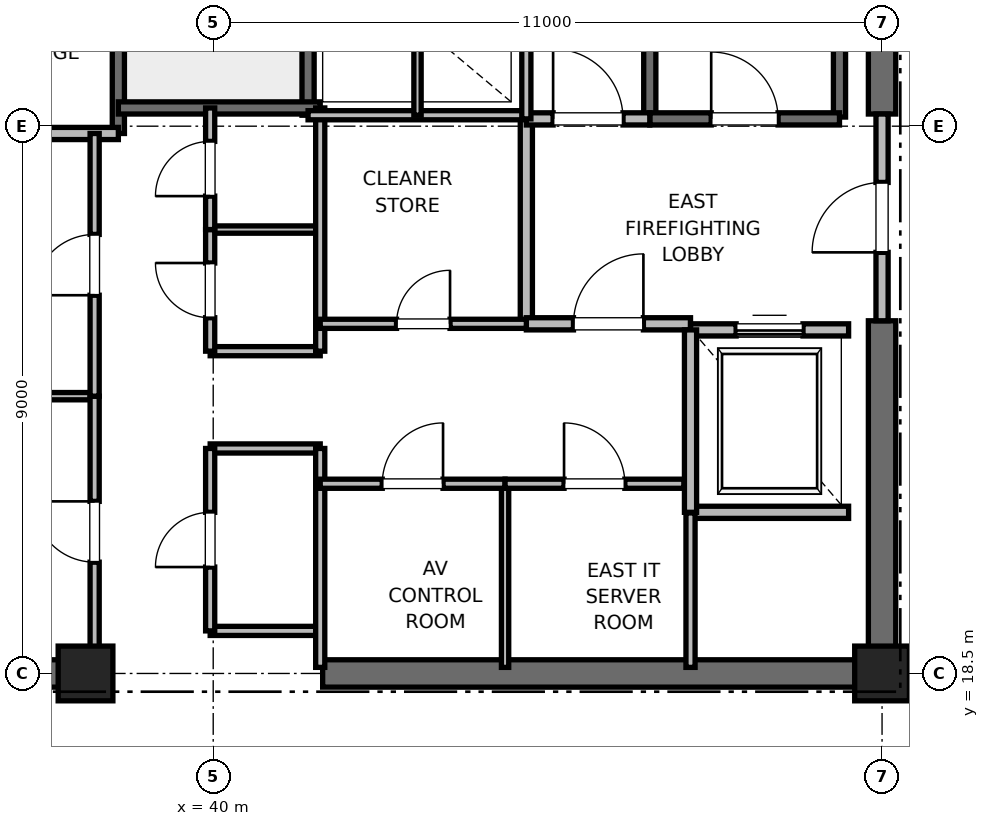
"""IFC4 building model, lengths in metres.
Left out: names, types, materials, properties, quantities, classifications, styles, units other than length and angle.
Written with IfcOpenShell. Run it as: python <this file> out.ifc"""

import sys

from ifc_helpers import new_model, si_unit, direction, frame, frame_2d, origin, origin_2d, place, context, subcontext, project, spatial, rectangle, extrude, element, fill, save


model = new_model("IFC4")
c1 = context("Model", 3, precision=1e-05, world=origin(), true_north=direction((0.0, 1.0)))
c2 = subcontext(c1, "Body", "Model", "MODEL_VIEW")
j1 = project(units=[si_unit("LENGTHUNIT", "METRE"), si_unit("PLANEANGLEUNIT", "RADIAN")], contexts=[c1])
p1 = place(None, origin())
s1 = spatial("IfcSite", under=j1, at=p1, CompositionType="ELEMENT")
p2 = place(p1, origin())
s2 = spatial("IfcBuilding", under=s1, at=p2, CompositionType="ELEMENT")
p3 = place(p2, frame((0.0, 0.0, 255.2)))
s3 = spatial("IfcBuildingStorey", under=s2, at=p3, CompositionType="ELEMENT", Elevation=255.2)
for number, where, z_axis, x_axis in (
    (1, (51.0, 18.5, 0.0), (0.0, 0.0, 1.0), (1.0, 0.0, 0.0)),
    (2, (37.9, 18.5, 0.0), (0.0, 0.0, 1.0), (1.0, 0.0, 0.0)),
):
    element("IfcColumn", number, at=place(p3, frame(where, z_axis=z_axis, x_axis=x_axis)), inside=s3, PredefinedType="PILASTER", context=c2, shape_type="SweptSolid", body=[
        extrude(rectangle(XDim=0.9, YDim=0.9, at=origin_2d()), origin(), (0.0, 0.0, 1.0), 4.0),
    ])
for number, where, z_axis, x_axis in (
    (3, (29.0, 18.5, 0.0), (0.0, 0.0, 1.0), (1.0, 0.0, 0.0)),
    (4, (41.8, 18.5, 0.0), (0.0, 0.0, 1.0), (1.0, 0.0, 0.0)),
):
    element("IfcWall", number, at=place(p3, frame(where, z_axis=z_axis, x_axis=x_axis)), inside=s3, PredefinedType="SHEAR", context=c2, shape_type="SweptSolid", body=[
        extrude(rectangle(XDim=9.2, YDim=0.45, at=frame_2d((4.6, 0.0))), origin(), (0.0, 0.0, 1.0), 3.785),
    ])
p4 = place(p3, frame((51.0, 18.5, 0.0), z_axis=(0.0, 0.0, 1.0), x_axis=(0.0, 1.0, 0.0)))
e5 = element("IfcWall", 5, at=p4, inside=s3, PredefinedType="SHEAR", context=c2, shape_type="SweptSolid", body=[
    extrude(rectangle(XDim=5.8, YDim=0.45, at=frame_2d((2.9, 0.0))), origin(), (0.0, 0.0, 1.0), 3.785),
])
p5 = place(p3, frame((51.0, 27.7, 0.0), z_axis=(0.0, 0.0, 1.0), x_axis=(0.0, 1.0, 0.0)))
e6 = element("IfcWall", 6, at=p5, inside=s3, PredefinedType="SHEAR", context=c2, shape_type="SweptSolid", body=[
    extrude(rectangle(XDim=8.8, YDim=0.45, at=frame_2d((4.4, 0.0))), origin(), (0.0, 0.0, 1.0), 3.785),
])
p6 = place(p3, frame((50.3, 27.65, 0.0), z_axis=(0.0, 0.0, 1.0), x_axis=(0.0, 1.0, 0.0)))
e7 = element("IfcWall", 7, at=p6, inside=s3, PredefinedType="SOLIDWALL", context=c2, shape_type="SweptSolid", body=[
    extrude(rectangle(XDim=8.15, YDim=0.2, at=frame_2d((4.075, 0.0))), origin(), (0.0, 0.0, 1.0), 3.785),
])
p7 = place(p3, frame((47.18, 27.62, 0.0), z_axis=(0.0, 0.0, 1.0), x_axis=(0.0, 1.0, 0.0)))
e8 = element("IfcWall", 8, at=p7, inside=s3, PredefinedType="SOLIDWALL", context=c2, shape_type="SweptSolid", body=[
    extrude(rectangle(XDim=8.18, YDim=0.2, at=frame_2d((4.09, 0.0))), origin(), (0.0, 0.0, 1.0), 3.785),
])
p8 = place(p3, frame((47.18, 27.62, 0.0), z_axis=(0.0, 0.0, 1.0), x_axis=(1.0, 0.0, 0.0)))
e9 = element("IfcWall", 9, at=p8, inside=s3, PredefinedType="SOLIDWALL", context=c2, shape_type="SweptSolid", body=[
    extrude(rectangle(XDim=3.12, YDim=0.2, at=frame_2d((1.56, 0.0))), origin(), (0.0, 0.0, 1.0), 3.785),
])
p9 = place(p8, frame((1.01, 0.0, 0.0)))
e10 = element("IfcOpeningElement", 10, at=p9, cuts=e9, PredefinedType="OPENING", context=c2, shape_type="SweptSolid", body=[
    extrude(rectangle(XDim=1.1, YDim=2.15, at=frame_2d((0.55, 1.075))), frame((0.0, 0.1, 0.0), z_axis=(0.0, -1.0, 0.0), x_axis=(1.0, 0.0, 0.0)), (0.0, 0.0, 1.0), 0.2),
])
p10 = place(p3, frame((38.44, 27.38, 0.0), z_axis=(0.0, 0.0, 1.0), x_axis=(0.0, 1.0, 0.0)))
e11 = element("IfcWall", 11, at=p10, inside=s3, PredefinedType="SOLIDWALL", context=c2, shape_type="SweptSolid", body=[
    extrude(rectangle(XDim=8.87, YDim=0.2, at=frame_2d((4.435, 0.0))), origin(), (0.0, 0.0, 1.0), 3.785),
])
p11 = place(p3, frame((41.56, 27.68, 0.0), z_axis=(0.0, 0.0, 1.0), x_axis=(0.0, 1.0, 0.0)))
e12 = element("IfcWall", 12, at=p11, inside=s3, PredefinedType="SOLIDWALL", context=c2, shape_type="SweptSolid", body=[
    extrude(rectangle(XDim=8.57, YDim=0.2, at=frame_2d((4.285, 0.0))), origin(), (0.0, 0.0, 1.0), 3.785),
])
p12 = place(p3, frame((38.44, 27.8, 0.0), z_axis=(0.0, 0.0, 1.0), x_axis=(1.0, 0.0, 0.0)))
e13 = element("IfcWall", 13, at=p12, inside=s3, PredefinedType="SOLIDWALL", context=c2, shape_type="SweptSolid", body=[
    extrude(rectangle(XDim=3.32, YDim=0.2, at=frame_2d((1.66, 0.0))), origin(), (0.0, 0.0, 1.0), 3.785),
])
p13 = place(p3, frame((32.82, 27.38, 0.0), z_axis=(0.0, 0.0, 1.0), x_axis=(1.0, 0.0, 0.0)))
e14 = element("IfcWall", 14, at=p13, inside=s3, PredefinedType="PARTITIONING", context=c2, shape_type="SweptSolid", body=[
    extrude(rectangle(XDim=5.62, YDim=0.2, at=frame_2d((2.81, 0.0))), origin(), (0.0, 0.0, 1.0), 3.785),
])
p14 = place(p3, frame((45.15, 24.25, 0.0), z_axis=(0.0, 0.0, 1.0), x_axis=(0.0, 1.0, 0.0)))
e15 = element("IfcWall", 15, at=p14, inside=s3, PredefinedType="PARTITIONING", context=c2, shape_type="SweptSolid", body=[
    extrude(rectangle(XDim=3.37, YDim=0.2, at=frame_2d((1.685, 0.0))), origin(), (0.0, 0.0, 1.0), 3.785),
])
p15 = place(p3, frame((45.15, 24.25, 0.0), z_axis=(0.0, 0.0, 1.0), x_axis=(1.0, 0.0, 0.0)))
e16 = element("IfcWall", 16, at=p15, inside=s3, PredefinedType="PARTITIONING", context=c2, shape_type="SweptSolid", body=[
    extrude(rectangle(XDim=2.7, YDim=0.2, at=frame_2d((1.35, 0.0))), origin(), (0.0, 0.0, 1.0), 3.785),
])
p16 = place(p15, frame((0.775, 0.0, 0.0)))
e17 = element("IfcOpeningElement", 17, at=p16, cuts=e16, PredefinedType="OPENING", context=c2, shape_type="SweptSolid", body=[
    extrude(rectangle(XDim=1.15, YDim=2.2, at=frame_2d((0.575, 1.1))), frame((0.0, 0.1, 0.0), z_axis=(0.0, -1.0, 0.0), x_axis=(1.0, 0.0, 0.0)), (0.0, 0.0, 1.0), 0.2),
])
p17 = place(p3, frame((45.15, 27.62, 0.0), z_axis=(0.0, 0.0, 1.0), x_axis=(1.0, 0.0, 0.0)))
e18 = element("IfcWall", 18, at=p17, inside=s3, PredefinedType="PARTITIONING", context=c2, shape_type="SweptSolid", body=[
    extrude(rectangle(XDim=2.03, YDim=0.2, at=frame_2d((1.015, 0.0))), origin(), (0.0, 0.0, 1.0), 3.785),
])
p18 = place(p17, frame((0.44, 0.0, 0.0)))
e19 = element("IfcOpeningElement", 19, at=p18, cuts=e18, PredefinedType="OPENING", context=c2, shape_type="SweptSolid", body=[
    extrude(rectangle(XDim=1.15, YDim=2.2, at=frame_2d((0.575, 1.1))), frame((0.0, 0.1, 0.0), z_axis=(0.0, -1.0, 0.0), x_axis=(1.0, 0.0, 0.0)), (0.0, 0.0, 1.0), 0.2),
])
p19 = place(p3, frame((51.0, 24.3, 0.0), z_axis=(0.0, 0.0, 1.0), x_axis=(0.0, 1.0, 0.0)))
e20 = element("IfcWall", 20, at=p19, inside=s3, PredefinedType="PARTITIONING", context=c2, shape_type="SweptSolid", body=[
    extrude(rectangle(XDim=3.4, YDim=0.2, at=frame_2d((1.7, 0.0))), origin(), (0.0, 0.0, 1.0), 2.865),
])
p20 = place(p19, frame((1.125, 0.0, 0.0)))
e21 = element("IfcOpeningElement", 21, at=p20, cuts=e20, PredefinedType="OPENING", context=c2, shape_type="SweptSolid", body=[
    extrude(rectangle(XDim=1.15, YDim=2.2, at=frame_2d((0.575, 1.1))), frame((0.0, 0.1, 0.0), z_axis=(0.0, -1.0, 0.0), x_axis=(1.0, 0.0, 0.0)), (0.0, 0.0, 1.0), 0.2),
])
p21 = place(p3, frame((47.85, 21.15, 0.0), z_axis=(0.0, 0.0, 1.0), x_axis=(1.0, 0.0, 0.0)))
e22 = element("IfcWall", 22, at=p21, inside=s3, PredefinedType="SOLIDWALL", context=c2, shape_type="SweptSolid", body=[
    extrude(rectangle(XDim=2.6, YDim=0.2, at=frame_2d((1.3, 0.0))), origin(), (0.0, 0.0, 1.0), 3.785),
])
p22 = place(p3, frame((50.45, 24.15, 0.0), z_axis=(0.0, 0.0, 1.0), x_axis=(-1.0, 0.0, 0.0)))
e23 = element("IfcWall", 23, at=p22, inside=s3, PredefinedType="SOLIDWALL", context=c2, shape_type="SweptSolid", body=[
    extrude(rectangle(XDim=2.6, YDim=0.2, at=frame_2d((1.3, 0.0))), origin(), (0.0, 0.0, 1.0), 2.865),
])
p23 = place(p22, frame((0.75, 0.0, 0.0)))
e24 = element("IfcOpeningElement", 24, at=p23, cuts=e23, PredefinedType="OPENING", context=c2, shape_type="SweptSolid", body=[
    extrude(rectangle(XDim=1.1, YDim=2.2, at=frame_2d((0.55, 1.1))), frame((0.0, 0.1, 0.0), z_axis=(0.0, -1.0, 0.0), x_axis=(1.0, 0.0, 0.0)), (0.0, 0.0, 1.0), 0.2),
])
p24 = place(p3, frame((47.85, 24.15, 0.0), z_axis=(0.0, 0.0, 1.0), x_axis=(0.0, -1.0, 0.0)))
e25 = element("IfcWall", 25, at=p24, inside=s3, PredefinedType="SOLIDWALL", context=c2, shape_type="SweptSolid", body=[
    extrude(rectangle(XDim=3.0, YDim=0.2, at=frame_2d((1.5, 0.0))), origin(), (0.0, 0.0, 1.0), 3.785),
])
for number, where, z_axis, x_axis in (
    (26, (39.95, 19.2, 0.0), (0.0, 0.0, 1.0), (1.0, 0.0, 0.0)),
    (27, (39.95, 22.2, 0.0), (0.0, 0.0, 1.0), (1.0, 0.0, 0.0)),
    (28, (39.95, 23.8, 0.0), (0.0, 0.0, 1.0), (1.0, 0.0, 0.0)),
):
    element("IfcWall", number, at=place(p3, frame(where, z_axis=z_axis, x_axis=x_axis)), inside=s3, PredefinedType="PARTITIONING", context=c2, shape_type="SweptSolid", body=[
        extrude(rectangle(XDim=1.81, YDim=0.15, at=frame_2d((0.905, 0.0))), origin(), (0.0, 0.0, 1.0), 2.85),
    ])
p25 = place(p3, frame((39.95, 25.8, 0.0), z_axis=(0.0, 0.0, 1.0), x_axis=(1.0, 0.0, 0.0)))
e29 = element("IfcWall", 29, at=p25, inside=s3, PredefinedType="PARTITIONING", context=c2, shape_type="SweptSolid", body=[
    extrude(rectangle(XDim=1.81, YDim=0.12, at=frame_2d((0.905, 0.0))), origin(), (0.0, 0.0, 1.0), 2.85),
])
p26 = place(p3, frame((41.76, 18.6, 0.0), z_axis=(0.0, 0.0, 1.0), x_axis=(0.0, 1.0, 0.0)))
e30 = element("IfcWall", 30, at=p26, inside=s3, PredefinedType="PARTITIONING", context=c2, shape_type="SweptSolid", body=[
    extrude(rectangle(XDim=3.6, YDim=0.15, at=frame_2d((1.8, 0.0))), origin(), (0.0, 0.0, 1.0), 2.85),
])
p27 = place(p3, frame((41.76, 23.8, 0.0), z_axis=(0.0, 0.0, 1.0), x_axis=(0.0, 1.0, 0.0)))
e31 = element("IfcWall", 31, at=p27, inside=s3, PredefinedType="PARTITIONING", context=c2, shape_type="SweptSolid", body=[
    extrude(rectangle(XDim=4.0, YDim=0.15, at=frame_2d((2.0, 0.0))), origin(), (0.0, 0.0, 1.0), 2.85),
])
p28 = place(p3, frame((39.95, 19.2, 0.0), z_axis=(0.0, 0.0, 1.0), x_axis=(0.0, 1.0, 0.0)))
e32 = element("IfcWall", 32, at=p28, inside=s3, PredefinedType="PARTITIONING", context=c2, shape_type="SweptSolid", body=[
    extrude(rectangle(XDim=3.0, YDim=0.15, at=frame_2d((1.5, 0.0))), origin(), (0.0, 0.0, 1.0), 2.85),
])
p29 = place(p28, frame((1.05, 0.0, 0.0)))
e33 = element("IfcOpeningElement", 33, at=p29, cuts=e32, PredefinedType="OPENING", context=c2, shape_type="SweptSolid", body=[
    extrude(rectangle(XDim=0.9, YDim=2.1, at=frame_2d((0.45, 1.05))), frame((0.0, 0.075, 0.0), z_axis=(0.0, -1.0, 0.0), x_axis=(1.0, 0.0, 0.0)), (0.0, 0.0, 1.0), 0.15),
])
p30 = place(p3, frame((39.95, 23.8, 0.0), z_axis=(0.0, 0.0, 1.0), x_axis=(0.0, 1.0, 0.0)))
e34 = element("IfcWall", 34, at=p30, inside=s3, PredefinedType="PARTITIONING", context=c2, shape_type="SweptSolid", body=[
    extrude(rectangle(XDim=2.0, YDim=0.15, at=frame_2d((1.0, 0.0))), origin(), (0.0, 0.0, 1.0), 2.85),
])
p31 = place(p30, frame((0.55, 0.0, 0.0)))
e35 = element("IfcOpeningElement", 35, at=p31, cuts=e34, PredefinedType="OPENING", context=c2, shape_type="SweptSolid", body=[
    extrude(rectangle(XDim=0.9, YDim=2.1, at=frame_2d((0.45, 1.05))), frame((0.0, 0.075, 0.0), z_axis=(0.0, -1.0, 0.0), x_axis=(1.0, 0.0, 0.0)), (0.0, 0.0, 1.0), 0.15),
])
p32 = place(p3, frame((39.95, 25.8, 0.0), z_axis=(0.0, 0.0, 1.0), x_axis=(0.0, 1.0, 0.0)))
e36 = element("IfcWall", 36, at=p32, inside=s3, PredefinedType="PARTITIONING", context=c2, shape_type="SweptSolid", body=[
    extrude(rectangle(XDim=2.0, YDim=0.15, at=frame_2d((1.0, 0.0))), origin(), (0.0, 0.0, 1.0), 2.85),
])
p33 = place(p32, frame((0.55, 0.0, 0.0)))
e37 = element("IfcOpeningElement", 37, at=p33, cuts=e36, PredefinedType="OPENING", context=c2, shape_type="SweptSolid", body=[
    extrude(rectangle(XDim=0.9, YDim=2.1, at=frame_2d((0.45, 1.05))), frame((0.0, 0.075, 0.0), z_axis=(0.0, -1.0, 0.0), x_axis=(1.0, 0.0, 0.0)), (0.0, 0.0, 1.0), 0.15),
])
p34 = place(p3, frame((32.82, 23.06, 0.0), z_axis=(0.0, 0.0, 1.0), x_axis=(1.0, 0.0, 0.0)))
e38 = element("IfcWall", 38, at=p34, inside=s3, PredefinedType="PARTITIONING", context=c2, shape_type="SweptSolid", body=[
    extrude(rectangle(XDim=5.23, YDim=0.12, at=frame_2d((2.615, 0.0))), origin(), (0.0, 0.0, 1.0), 2.85),
])
p35 = place(p3, frame((38.05, 18.6, 0.0), z_axis=(0.0, 0.0, 1.0), x_axis=(0.0, 1.0, 0.0)))
e39 = element("IfcWall", 39, at=p35, inside=s3, PredefinedType="PARTITIONING", context=c2, shape_type="SweptSolid", body=[
    extrude(rectangle(XDim=4.46, YDim=0.15, at=frame_2d((2.23, 0.0))), origin(), (0.0, 0.0, 1.0), 2.85),
])
p36 = place(p35, frame((1.73, 0.0, 0.0)))
e40 = element("IfcOpeningElement", 40, at=p36, cuts=e39, PredefinedType="OPENING", context=c2, shape_type="SweptSolid", body=[
    extrude(rectangle(XDim=1.0, YDim=2.15, at=frame_2d((0.5, 1.075))), frame((0.0, 0.075, 0.0), z_axis=(0.0, -1.0, 0.0), x_axis=(1.0, 0.0, 0.0)), (0.0, 0.0, 1.0), 0.15),
])
p37 = place(p3, frame((38.05, 23.06, 0.0), z_axis=(0.0, 0.0, 1.0), x_axis=(0.0, 1.0, 0.0)))
e41 = element("IfcWall", 41, at=p37, inside=s3, PredefinedType="PARTITIONING", context=c2, shape_type="SweptSolid", body=[
    extrude(rectangle(XDim=4.32, YDim=0.15, at=frame_2d((2.16, 0.0))), origin(), (0.0, 0.0, 1.0), 2.85),
])
p38 = place(p37, frame((1.66, 0.0, 0.0)))
e42 = element("IfcOpeningElement", 42, at=p38, cuts=e41, PredefinedType="OPENING", context=c2, shape_type="SweptSolid", body=[
    extrude(rectangle(XDim=1.0, YDim=2.15, at=frame_2d((0.5, 1.075))), frame((0.0, 0.075, 0.0), z_axis=(0.0, -1.0, 0.0), x_axis=(1.0, 0.0, 0.0)), (0.0, 0.0, 1.0), 0.15),
])
p39 = place(p3, frame((41.56, 27.68, 0.0), z_axis=(0.0, 0.0, 1.0), x_axis=(1.0, 0.0, 0.0)))
e43 = element("IfcWall", 43, at=p39, inside=s3, PredefinedType="PARTITIONING", context=c2, shape_type="SweptSolid", body=[
    extrude(rectangle(XDim=3.59, YDim=0.15, at=frame_2d((1.795, 0.0))), origin(), (0.0, 0.0, 1.0), 2.85),
])
p40 = place(p3, frame((47.85, 18.6, 0.0), z_axis=(0.0, 0.0, 1.0), x_axis=(0.0, 1.0, 0.0)))
e44 = element("IfcWall", 44, at=p40, inside=s3, PredefinedType="PARTITIONING", context=c2, shape_type="SweptSolid", body=[
    extrude(rectangle(XDim=2.54, YDim=0.15, at=frame_2d((1.27, 0.0))), origin(), (0.0, 0.0, 1.0), 2.85),
])
p41 = place(p3, frame((44.8, 18.6, 0.0), z_axis=(0.0, 0.0, 1.0), x_axis=(0.0, 1.0, 0.0)))
e45 = element("IfcWall", 45, at=p41, inside=s3, PredefinedType="PARTITIONING", context=c2, shape_type="SweptSolid", body=[
    extrude(rectangle(XDim=3.02, YDim=0.12, at=frame_2d((1.51, 0.0))), origin(), (0.0, 0.0, 1.0), 2.85),
])
p42 = place(p3, frame((41.76, 21.62, 0.0), z_axis=(0.0, 0.0, 1.0), x_axis=(1.0, 0.0, 0.0)))
e46 = element("IfcWall", 46, at=p42, inside=s3, PredefinedType="PARTITIONING", context=c2, shape_type="SweptSolid", body=[
    extrude(rectangle(XDim=3.04, YDim=0.15, at=frame_2d((1.52, 0.0))), origin(), (0.0, 0.0, 1.0), 2.85),
])
p43 = place(p42, frame((1.02, 0.0, 0.0)))
e47 = element("IfcOpeningElement", 47, at=p43, cuts=e46, PredefinedType="OPENING", context=c2, shape_type="SweptSolid", body=[
    extrude(rectangle(XDim=1.0, YDim=2.15, at=frame_2d((0.5, 1.075))), frame((0.0, 0.075, 0.0), z_axis=(0.0, -1.0, 0.0), x_axis=(1.0, 0.0, 0.0)), (0.0, 0.0, 1.0), 0.15),
])
p44 = place(p3, frame((44.8, 21.62, 0.0), z_axis=(0.0, 0.0, 1.0), x_axis=(1.0, 0.0, 0.0)))
e48 = element("IfcWall", 48, at=p44, inside=s3, PredefinedType="PARTITIONING", context=c2, shape_type="SweptSolid", body=[
    extrude(rectangle(XDim=2.94, YDim=0.15, at=frame_2d((1.47, 0.0))), origin(), (0.0, 0.0, 1.0), 2.85),
])
p45 = place(p44, frame((0.97, 0.0, 0.0)))
e49 = element("IfcOpeningElement", 49, at=p45, cuts=e48, PredefinedType="OPENING", context=c2, shape_type="SweptSolid", body=[
    extrude(rectangle(XDim=1.0, YDim=2.15, at=frame_2d((0.5, 1.075))), frame((0.0, 0.075, 0.0), z_axis=(0.0, -1.0, 0.0), x_axis=(1.0, 0.0, 0.0)), (0.0, 0.0, 1.0), 0.15),
])
p46 = place(p3, frame((41.76, 24.25, 0.0), z_axis=(0.0, 0.0, 1.0), x_axis=(1.0, 0.0, 0.0)))
e50 = element("IfcWall", 50, at=p46, inside=s3, PredefinedType="PARTITIONING", context=c2, shape_type="SweptSolid", body=[
    extrude(rectangle(XDim=3.39, YDim=0.15, at=frame_2d((1.695, 0.0))), origin(), (0.0, 0.0, 1.0), 2.85),
])
p47 = place(p46, frame((1.255, 0.0, 0.0)))
e51 = element("IfcOpeningElement", 51, at=p47, cuts=e50, PredefinedType="OPENING", context=c2, shape_type="SweptSolid", body=[
    extrude(rectangle(XDim=0.88, YDim=2.1, at=frame_2d((0.44, 1.05))), frame((0.0, 0.075, 0.0), z_axis=(0.0, -1.0, 0.0), x_axis=(1.0, 0.0, 0.0)), (0.0, 0.0, 1.0), 0.15),
])
p48 = place(p3, frame((45.15, 27.62, 0.0), z_axis=(0.0, 0.0, 1.0), x_axis=(0.0, 1.0, 0.0)))
e52 = element("IfcWall", 52, at=p48, inside=s3, PredefinedType="PARTITIONING", context=c2, shape_type="SweptSolid", body=[
    extrude(rectangle(XDim=3.1, YDim=0.15, at=frame_2d((1.55, 0.0))), origin(), (0.0, 0.0, 1.0), 2.85),
])
p49 = place(p3, frame((43.36, 27.68, 0.0), z_axis=(0.0, 0.0, 1.0), x_axis=(0.0, 1.0, 0.0)))
e53 = element("IfcWall", 53, at=p49, inside=s3, PredefinedType="PARTITIONING", context=c2, shape_type="SweptSolid", body=[
    extrude(rectangle(XDim=3.04, YDim=0.12, at=frame_2d((1.52, 0.0))), origin(), (0.0, 0.0, 1.0), 2.85),
])
p50 = place(p9, origin())
e54 = element("IfcDoor", 54, at=p50, inside=s3, OperationType="SINGLE_SWING_LEFT", PredefinedType="DOOR", context=c2, shape_type="SweptSolid", body=[
    extrude(rectangle(XDim=1.1, YDim=2.15, at=frame_2d((0.55, 1.075))), frame((0.0, 0.025, 0.0), z_axis=(0.0, -1.0, 0.0), x_axis=(1.0, 0.0, 0.0)), (0.0, 0.0, 1.0), 0.05),
])
fill(e10, e54)
p51 = place(p16, origin())
e55 = element("IfcDoor", 55, at=p51, inside=s3, OperationType="SINGLE_SWING_RIGHT", PredefinedType="DOOR", context=c2, shape_type="SweptSolid", body=[
    extrude(rectangle(XDim=1.15, YDim=2.2, at=frame_2d((0.575, 1.1))), frame((0.0, 0.025, 0.0), z_axis=(0.0, -1.0, 0.0), x_axis=(1.0, 0.0, 0.0)), (0.0, 0.0, 1.0), 0.05),
])
fill(e17, e55)
p52 = place(p18, origin())
e56 = element("IfcDoor", 56, at=p52, inside=s3, OperationType="SINGLE_SWING_LEFT", PredefinedType="DOOR", context=c2, shape_type="SweptSolid", body=[
    extrude(rectangle(XDim=1.15, YDim=2.2, at=frame_2d((0.575, 1.1))), frame((0.0, 0.025, 0.0), z_axis=(0.0, -1.0, 0.0), x_axis=(1.0, 0.0, 0.0)), (0.0, 0.0, 1.0), 0.05),
])
fill(e19, e56)
p53 = place(p20, origin())
e57 = element("IfcDoor", 57, at=p53, inside=s3, OperationType="SINGLE_SWING_LEFT", PredefinedType="DOOR", context=c2, shape_type="SweptSolid", body=[
    extrude(rectangle(XDim=1.15, YDim=2.2, at=frame_2d((0.575, 1.1))), frame((0.0, 0.025, 0.0), z_axis=(0.0, -1.0, 0.0), x_axis=(1.0, 0.0, 0.0)), (0.0, 0.0, 1.0), 0.05),
])
fill(e21, e57)
p54 = place(p23, origin())
e58 = element("IfcDoor", 58, at=p54, inside=s3, OperationType="SLIDING_TO_RIGHT", PredefinedType="DOOR", context=c2, shape_type="SweptSolid", body=[
    extrude(rectangle(XDim=1.1, YDim=2.2, at=frame_2d((0.55, 1.1))), frame((0.0, 0.025, 0.0), z_axis=(0.0, -1.0, 0.0), x_axis=(1.0, 0.0, 0.0)), (0.0, 0.0, 1.0), 0.05),
])
fill(e24, e58)
p55 = place(p29, origin())
e59 = element("IfcDoor", 59, at=p55, inside=s3, OperationType="SINGLE_SWING_LEFT", PredefinedType="DOOR", context=c2, shape_type="SweptSolid", body=[
    extrude(rectangle(XDim=0.9, YDim=2.1, at=frame_2d((0.45, 1.05))), frame((0.0, 0.025, 0.0), z_axis=(0.0, -1.0, 0.0), x_axis=(1.0, 0.0, 0.0)), (0.0, 0.0, 1.0), 0.05),
])
fill(e33, e59)
p56 = place(p31, origin())
e60 = element("IfcDoor", 60, at=p56, inside=s3, OperationType="SINGLE_SWING_RIGHT", PredefinedType="DOOR", context=c2, shape_type="SweptSolid", body=[
    extrude(rectangle(XDim=0.9, YDim=2.1, at=frame_2d((0.45, 1.05))), frame((0.0, 0.025, 0.0), z_axis=(0.0, -1.0, 0.0), x_axis=(1.0, 0.0, 0.0)), (0.0, 0.0, 1.0), 0.05),
])
fill(e35, e60)
p57 = place(p33, origin())
e61 = element("IfcDoor", 61, at=p57, inside=s3, OperationType="SINGLE_SWING_LEFT", PredefinedType="DOOR", context=c2, shape_type="SweptSolid", body=[
    extrude(rectangle(XDim=0.9, YDim=2.1, at=frame_2d((0.45, 1.05))), frame((0.0, 0.025, 0.0), z_axis=(0.0, -1.0, 0.0), x_axis=(1.0, 0.0, 0.0)), (0.0, 0.0, 1.0), 0.05),
])
fill(e37, e61)
p58 = place(p36, origin())
e62 = element("IfcDoor", 62, at=p58, inside=s3, OperationType="SINGLE_SWING_RIGHT", PredefinedType="DOOR", context=c2, shape_type="SweptSolid", body=[
    extrude(rectangle(XDim=1.0, YDim=2.15, at=frame_2d((0.5, 1.075))), frame((0.0, 0.025, 0.0), z_axis=(0.0, -1.0, 0.0), x_axis=(1.0, 0.0, 0.0)), (0.0, 0.0, 1.0), 0.05),
])
fill(e40, e62)
p59 = place(p38, origin())
e63 = element("IfcDoor", 63, at=p59, inside=s3, OperationType="SINGLE_SWING_LEFT", PredefinedType="DOOR", context=c2, shape_type="SweptSolid", body=[
    extrude(rectangle(XDim=1.0, YDim=2.15, at=frame_2d((0.5, 1.075))), frame((0.0, 0.025, 0.0), z_axis=(0.0, -1.0, 0.0), x_axis=(1.0, 0.0, 0.0)), (0.0, 0.0, 1.0), 0.05),
])
fill(e42, e63)
p60 = place(p43, origin())
e64 = element("IfcDoor", 64, at=p60, inside=s3, OperationType="SINGLE_SWING_RIGHT", PredefinedType="DOOR", context=c2, shape_type="SweptSolid", body=[
    extrude(rectangle(XDim=1.0, YDim=2.15, at=frame_2d((0.5, 1.075))), frame((0.0, 0.025, 0.0), z_axis=(0.0, -1.0, 0.0), x_axis=(1.0, 0.0, 0.0)), (0.0, 0.0, 1.0), 0.05),
])
fill(e47, e64)
p61 = place(p45, origin())
e65 = element("IfcDoor", 65, at=p61, inside=s3, OperationType="SINGLE_SWING_LEFT", PredefinedType="DOOR", context=c2, shape_type="SweptSolid", body=[
    extrude(rectangle(XDim=1.0, YDim=2.15, at=frame_2d((0.5, 1.075))), frame((0.0, 0.025, 0.0), z_axis=(0.0, -1.0, 0.0), x_axis=(1.0, 0.0, 0.0)), (0.0, 0.0, 1.0), 0.05),
])
fill(e49, e65)
p62 = place(p47, origin())
e66 = element("IfcDoor", 66, at=p62, inside=s3, OperationType="SINGLE_SWING_RIGHT", PredefinedType="DOOR", context=c2, shape_type="SweptSolid", body=[
    extrude(rectangle(XDim=0.88, YDim=2.1, at=frame_2d((0.44, 1.05))), frame((0.0, 0.025, 0.0), z_axis=(0.0, -1.0, 0.0), x_axis=(1.0, 0.0, 0.0)), (0.0, 0.0, 1.0), 0.05),
])
fill(e51, e66)
save(model, sys.argv[1])
